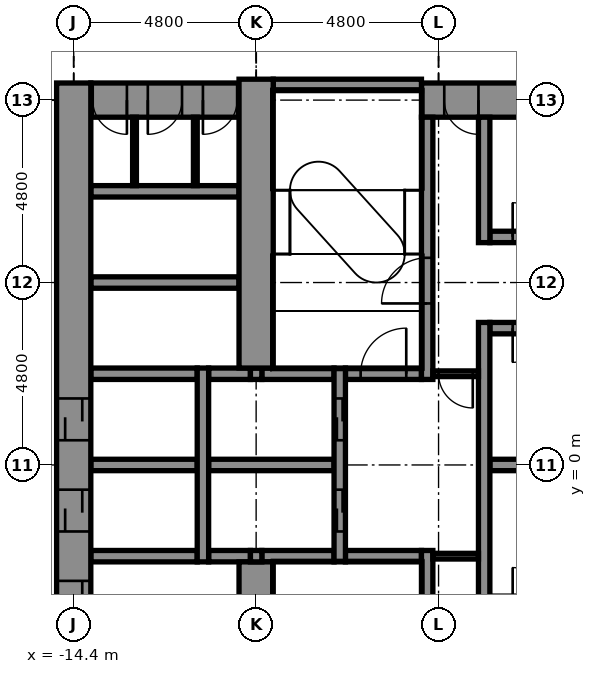
"""IFC4 building model, lengths in metres.
Left out: names, types, materials, properties, quantities, classifications, styles, units other than length and angle.
Written with IfcOpenShell. Run it as: python <this file> out.ifc"""

import sys

from ifc_helpers import new_model, si_unit, direction, frame, frame_2d, origin, place, context, subcontext, project, spatial, rectangle, extrude, element, fill, save


model = new_model("IFC4")
c1 = context("Model", 3, precision=1e-05, world=origin(), true_north=direction((0.0, 1.0)))
c2 = subcontext(c1, "Body", "Model", "MODEL_VIEW")
j1 = project(units=[si_unit("LENGTHUNIT", "METRE"), si_unit("PLANEANGLEUNIT", "RADIAN")], contexts=[c1])
p1 = place(None, origin())
s1 = spatial("IfcSite", under=j1, at=p1, CompositionType="ELEMENT")
p2 = place(p1, origin())
s2 = spatial("IfcBuilding", under=s1, at=p2, CompositionType="ELEMENT")
p3 = place(p2, frame((0.0, 0.0, 122.9)))
s3 = spatial("IfcBuildingStorey", under=s2, at=p3, CompositionType="ELEMENT", Elevation=122.9)
p4 = place(p3, frame((-13.95, -2.4, -0.2), z_axis=(0.0, 0.0, 1.0), x_axis=(1.0, 0.0, 0.0)))
e1 = element("IfcWall", 1, at=p4, inside=s3, PredefinedType="STANDARD", context=c2, shape_type="SweptSolid", body=[
    extrude(rectangle(XDim=2.8, YDim=0.3, at=frame_2d((1.4, 0.0))), origin(), (0.0, 0.0, 1.0), 4.4),
])
p5 = place(p3, frame((-10.85, -2.4, -0.2), z_axis=(0.0, 0.0, 1.0), x_axis=(1.0, 0.0, 0.0)))
e2 = element("IfcWall", 2, at=p5, inside=s3, PredefinedType="STANDARD", context=c2, shape_type="SweptSolid", body=[
    extrude(rectangle(XDim=1.1, YDim=0.3, at=frame_2d((0.55, 0.0))), origin(), (0.0, 0.0, 1.0), 4.4),
])
p6 = place(p3, frame((-9.45, -2.4, -0.2), z_axis=(0.0, 0.0, 1.0), x_axis=(1.0, 0.0, 0.0)))
e3 = element("IfcWall", 3, at=p6, inside=s3, PredefinedType="STANDARD", context=c2, shape_type="SweptSolid", body=[
    extrude(rectangle(XDim=1.9, YDim=0.3, at=frame_2d((0.95, 0.0))), origin(), (0.0, 0.0, 1.0), 4.4),
])
p7 = place(p3, frame((-7.25, -2.4, -0.2), z_axis=(0.0, 0.0, 1.0), x_axis=(1.0, 0.0, 0.0)))
e4 = element("IfcWall", 4, at=p7, inside=s3, PredefinedType="STANDARD", context=c2, shape_type="SweptSolid", body=[
    extrude(rectangle(XDim=2.0, YDim=0.3, at=frame_2d((1.0, 0.0))), origin(), (0.0, 0.0, 1.0), 4.4),
])
p8 = place(p3, frame((-13.95, 0.0, -0.2), z_axis=(0.0, 0.0, 1.0), x_axis=(1.0, 0.0, 0.0)))
e5 = element("IfcWall", 5, at=p8, inside=s3, PredefinedType="STANDARD", context=c2, shape_type="SweptSolid", body=[
    extrude(rectangle(XDim=2.8, YDim=0.3, at=frame_2d((1.4, 0.0))), origin(), (0.0, 0.0, 1.0), 4.4),
])
p9 = place(p3, frame((-10.85, 0.0, -0.2), z_axis=(0.0, 0.0, 1.0), x_axis=(1.0, 0.0, 0.0)))
e6 = element("IfcWall", 6, at=p9, inside=s3, PredefinedType="STANDARD", context=c2, shape_type="SweptSolid", body=[
    extrude(rectangle(XDim=3.3, YDim=0.3, at=frame_2d((1.65, 0.0))), origin(), (0.0, 0.0, 1.0), 4.4),
])
p10 = place(p3, frame((-3.45, 0.0, -0.2), z_axis=(0.0, 0.0, 1.0), x_axis=(1.0, 0.0, 0.0)))
e7 = element("IfcWall", 7, at=p10, inside=s3, PredefinedType="STANDARD", context=c2, shape_type="SweptSolid", body=[
    extrude(rectangle(XDim=2.1, YDim=0.3, at=frame_2d((1.05, 0.0))), origin(), (0.0, 0.0, 1.0), 4.4),
])
p11 = place(p3, frame((-13.95, 2.4, -0.2), z_axis=(0.0, 0.0, 1.0), x_axis=(1.0, 0.0, 0.0)))
e8 = element("IfcWall", 8, at=p11, inside=s3, PredefinedType="STANDARD", context=c2, shape_type="SweptSolid", body=[
    extrude(rectangle(XDim=2.8, YDim=0.3, at=frame_2d((1.4, 0.0))), origin(), (0.0, 0.0, 1.0), 4.4),
])
p12 = place(p3, frame((-10.85, 2.4, -0.2), z_axis=(0.0, 0.0, 1.0), x_axis=(1.0, 0.0, 0.0)))
e9 = element("IfcWall", 9, at=p12, inside=s3, PredefinedType="STANDARD", context=c2, shape_type="SweptSolid", body=[
    extrude(rectangle(XDim=1.1, YDim=0.3, at=frame_2d((0.55, 0.0))), origin(), (0.0, 0.0, 1.0), 4.4),
])
p13 = place(p3, frame((-9.45, 2.4, -0.2), z_axis=(0.0, 0.0, 1.0), x_axis=(1.0, 0.0, 0.0)))
e10 = element("IfcWall", 10, at=p13, inside=s3, PredefinedType="STANDARD", context=c2, shape_type="SweptSolid", body=[
    extrude(rectangle(XDim=1.9, YDim=0.3, at=frame_2d((0.95, 0.0))), origin(), (0.0, 0.0, 1.0), 4.4),
])
p14 = place(p3, frame((-7.25, 2.4, -0.2), z_axis=(0.0, 0.0, 1.0), x_axis=(1.0, 0.0, 0.0)))
e11 = element("IfcWall", 11, at=p14, inside=s3, PredefinedType="STANDARD", context=c2, shape_type="SweptSolid", body=[
    extrude(rectangle(XDim=2.0, YDim=0.3, at=frame_2d((1.0, 0.0))), origin(), (0.0, 0.0, 1.0), 4.4),
])
p15 = place(p14, frame((0.4, 0.0, 0.2)))
e12 = element("IfcOpeningElement", 12, at=p15, cuts=e11, PredefinedType="OPENING", context=c2, shape_type="SweptSolid", body=[
    extrude(rectangle(XDim=1.2, YDim=2.1, at=frame_2d((0.6, 1.05))), frame((0.0, 0.16, 0.0), z_axis=(0.0, -1.0, 0.0), x_axis=(1.0, 0.0, 0.0)), (0.0, 0.0, 1.0), 0.32),
])
p16 = place(p3, frame((-3.45, 3.6, -0.2), z_axis=(0.0, 0.0, 1.0), x_axis=(1.0, 0.0, 0.0)))
e13 = element("IfcWall", 13, at=p16, inside=s3, PredefinedType="STANDARD", context=c2, shape_type="SweptSolid", body=[
    extrude(rectangle(XDim=2.1, YDim=0.3, at=frame_2d((1.05, 0.0))), origin(), (0.0, 0.0, 1.0), 4.4),
])
p17 = place(p16, frame((0.6, 0.0, 0.2)))
e14 = element("IfcOpeningElement", 14, at=p17, cuts=e13, PredefinedType="OPENING", context=c2, shape_type="SweptSolid", body=[
    extrude(rectangle(XDim=0.9, YDim=2.1, at=frame_2d((0.45, 1.05))), frame((0.0, 0.16, 0.0), z_axis=(0.0, -1.0, 0.0), x_axis=(1.0, 0.0, 0.0)), (0.0, 0.0, 1.0), 0.32),
])
p18 = place(p3, frame((-13.95, 4.8, -0.2), z_axis=(0.0, 0.0, 1.0), x_axis=(1.0, 0.0, 0.0)))
e15 = element("IfcWall", 15, at=p18, inside=s3, PredefinedType="STANDARD", context=c2, shape_type="SweptSolid", body=[
    extrude(rectangle(XDim=3.9, YDim=0.3, at=frame_2d((1.95, 0.0))), origin(), (0.0, 0.0, 1.0), 4.4),
])
p19 = place(p3, frame((-3.45, 6.0, -0.2), z_axis=(0.0, 0.0, 1.0), x_axis=(1.0, 0.0, 0.0)))
e16 = element("IfcWall", 16, at=p19, inside=s3, PredefinedType="STANDARD", context=c2, shape_type="SweptSolid", body=[
    extrude(rectangle(XDim=2.1, YDim=0.3, at=frame_2d((1.05, 0.0))), origin(), (0.0, 0.0, 1.0), 4.4),
])
p20 = place(p19, frame((0.6, 0.0, 0.2)))
e17 = element("IfcOpeningElement", 17, at=p20, cuts=e16, PredefinedType="OPENING", context=c2, shape_type="SweptSolid", body=[
    extrude(rectangle(XDim=0.9, YDim=2.1, at=frame_2d((0.45, 1.05))), frame((0.0, 0.16, 0.0), z_axis=(0.0, -1.0, 0.0), x_axis=(1.0, 0.0, 0.0)), (0.0, 0.0, 1.0), 0.32),
])
p21 = place(p3, frame((-13.95, 7.2, -0.2), z_axis=(0.0, 0.0, 1.0), x_axis=(1.0, 0.0, 0.0)))
e18 = element("IfcWall", 18, at=p21, inside=s3, PredefinedType="STANDARD", context=c2, shape_type="SweptSolid", body=[
    extrude(rectangle(XDim=3.9, YDim=0.3, at=frame_2d((1.95, 0.0))), origin(), (0.0, 0.0, 1.0), 4.4),
])
p22 = place(p3, frame((-13.95, 9.6, -0.2), z_axis=(0.0, 0.0, 1.0), x_axis=(1.0, 0.0, 0.0)))
e19 = element("IfcWall", 19, at=p22, inside=s3, PredefinedType="SHEAR", context=c2, shape_type="SweptSolid", body=[
    extrude(rectangle(XDim=3.9, YDim=0.9, at=frame_2d((1.95, 0.0))), origin(), (0.0, 0.0, 1.0), 4.4),
])
p23 = place(p22, frame((0.05, 0.0, 0.2)))
e20 = element("IfcOpeningElement", 20, at=p23, cuts=e19, PredefinedType="OPENING", context=c2, shape_type="SweptSolid", body=[
    extrude(rectangle(XDim=0.9, YDim=2.1, at=frame_2d((0.45, 1.05))), frame((0.0, 0.46, 0.0), z_axis=(0.0, -1.0, 0.0), x_axis=(1.0, 0.0, 0.0)), (0.0, 0.0, 1.0), 0.92),
])
p24 = place(p22, frame((1.5, 0.0, 0.2)))
e21 = element("IfcOpeningElement", 21, at=p24, cuts=e19, PredefinedType="OPENING", context=c2, shape_type="SweptSolid", body=[
    extrude(rectangle(XDim=0.9, YDim=2.1, at=frame_2d((0.45, 1.05))), frame((0.0, 0.46, 0.0), z_axis=(0.0, -1.0, 0.0), x_axis=(1.0, 0.0, 0.0)), (0.0, 0.0, 1.0), 0.92),
])
p25 = place(p22, frame((2.95, 0.0, 0.2)))
e22 = element("IfcOpeningElement", 22, at=p25, cuts=e19, PredefinedType="OPENING", context=c2, shape_type="SweptSolid", body=[
    extrude(rectangle(XDim=0.9, YDim=2.1, at=frame_2d((0.45, 1.05))), frame((0.0, 0.46, 0.0), z_axis=(0.0, -1.0, 0.0), x_axis=(1.0, 0.0, 0.0)), (0.0, 0.0, 1.0), 0.92),
])
p26 = place(p3, frame((-5.25, 9.6, -0.2), z_axis=(0.0, 0.0, 1.0), x_axis=(1.0, 0.0, 0.0)))
e23 = element("IfcWall", 23, at=p26, inside=s3, PredefinedType="SHEAR", context=c2, shape_type="SweptSolid", body=[
    extrude(rectangle(XDim=14.4, YDim=0.9, at=frame_2d((7.2, 0.0))), origin(), (0.0, 0.0, 1.0), 4.4),
])
p27 = place(p26, frame((0.6, 0.0, 0.2)))
e24 = element("IfcOpeningElement", 24, at=p27, cuts=e23, PredefinedType="OPENING", context=c2, shape_type="SweptSolid", body=[
    extrude(rectangle(XDim=0.9, YDim=2.1, at=frame_2d((0.45, 1.05))), frame((0.0, 0.46, 0.0), z_axis=(0.0, -1.0, 0.0), x_axis=(1.0, 0.0, 0.0)), (0.0, 0.0, 1.0), 0.92),
])
p28 = place(p3, frame((-9.15, 10.0, -0.2), z_axis=(0.0, 0.0, 1.0), x_axis=(1.0, 0.0, 0.0)))
e25 = element("IfcWall", 25, at=p28, inside=s3, PredefinedType="STANDARD", context=c2, shape_type="SweptSolid", body=[
    extrude(rectangle(XDim=3.9, YDim=0.3, at=frame_2d((1.95, 0.0))), origin(), (0.0, 0.0, 1.0), 4.4),
])
p29 = place(p3, frame((-14.4, -10.05, -0.2), z_axis=(0.0, 0.0, 1.0), x_axis=(0.0, 1.0, 0.0)))
e26 = element("IfcWall", 26, at=p29, inside=s3, PredefinedType="SHEAR", context=c2, shape_type="SweptSolid", body=[
    extrude(rectangle(XDim=20.1, YDim=0.9, at=frame_2d((10.05, 0.0))), origin(), (0.0, 0.0, 1.0), 4.4),
])
p30 = place(p29, frame((3.5, 0.0, 0.2)))
e27 = element("IfcOpeningElement", 27, at=p30, cuts=e26, PredefinedType="OPENING", context=c2, shape_type="SweptSolid", body=[
    extrude(rectangle(XDim=1.1, YDim=2.1, at=frame_2d((0.55, 1.05))), frame((0.0, 0.46, 0.0), z_axis=(0.0, -1.0, 0.0), x_axis=(1.0, 0.0, 0.0)), (0.0, 0.0, 1.0), 0.92),
])
p31 = place(p29, frame((5.9, 0.0, 0.2)))
e28 = element("IfcOpeningElement", 28, at=p31, cuts=e26, PredefinedType="OPENING", context=c2, shape_type="SweptSolid", body=[
    extrude(rectangle(XDim=1.1, YDim=2.1, at=frame_2d((0.55, 1.05))), frame((0.0, 0.46, 0.0), z_axis=(0.0, -1.0, 0.0), x_axis=(1.0, 0.0, 0.0)), (0.0, 0.0, 1.0), 0.92),
])
p32 = place(p29, frame((8.3, 0.0, 0.2)))
e29 = element("IfcOpeningElement", 29, at=p32, cuts=e26, PredefinedType="OPENING", context=c2, shape_type="SweptSolid", body=[
    extrude(rectangle(XDim=1.1, YDim=2.1, at=frame_2d((0.55, 1.05))), frame((0.0, 0.46, 0.0), z_axis=(0.0, -1.0, 0.0), x_axis=(1.0, 0.0, 0.0)), (0.0, 0.0, 1.0), 0.92),
])
p33 = place(p29, frame((10.7, 0.0, 0.2)))
e30 = element("IfcOpeningElement", 30, at=p33, cuts=e26, PredefinedType="OPENING", context=c2, shape_type="SweptSolid", body=[
    extrude(rectangle(XDim=1.1, YDim=2.1, at=frame_2d((0.55, 1.05))), frame((0.0, 0.46, 0.0), z_axis=(0.0, -1.0, 0.0), x_axis=(1.0, 0.0, 0.0)), (0.0, 0.0, 1.0), 0.92),
])
p34 = place(p3, frame((-11.0, -2.55, -0.2), z_axis=(0.0, 0.0, 1.0), x_axis=(0.0, 1.0, 0.0)))
e31 = element("IfcWall", 31, at=p34, inside=s3, PredefinedType="STANDARD", context=c2, shape_type="SweptSolid", body=[
    extrude(rectangle(XDim=5.1, YDim=0.3, at=frame_2d((2.55, 0.0))), origin(), (0.0, 0.0, 1.0), 4.4),
])
p35 = place(p3, frame((-9.6, -10.15, -0.2), z_axis=(0.0, 0.0, 1.0), x_axis=(0.0, 1.0, 0.0)))
e32 = element("IfcWall", 32, at=p35, inside=s3, PredefinedType="SHEAR", context=c2, shape_type="SweptSolid", body=[
    extrude(rectangle(XDim=7.6, YDim=0.9, at=frame_2d((3.8, 0.0))), origin(), (0.0, 0.0, 1.0), 4.4),
])
for number, where, z_axis, x_axis in (
    (33, (-9.6, -2.55, -0.2), (0.0, 0.0, 1.0), (0.0, 1.0, 0.0)),
    (34, (-9.6, 2.25, -0.2), (0.0, 0.0, 1.0), (0.0, 1.0, 0.0)),
):
    element("IfcWall", number, at=place(p3, frame(where, z_axis=z_axis, x_axis=x_axis)), inside=s3, PredefinedType="STANDARD", context=c2, shape_type="SweptSolid", body=[
        extrude(rectangle(XDim=0.3, YDim=0.3, at=frame_2d((0.15, 0.0))), origin(), (0.0, 0.0, 1.0), 4.4),
    ])
p36 = place(p3, frame((-9.6, 2.55, -0.2), z_axis=(0.0, 0.0, 1.0), x_axis=(0.0, 1.0, 0.0)))
e35 = element("IfcWall", 35, at=p36, inside=s3, PredefinedType="SHEAR", context=c2, shape_type="SweptSolid", body=[
    extrude(rectangle(XDim=7.6, YDim=0.9, at=frame_2d((3.8, 0.0))), origin(), (0.0, 0.0, 1.0), 4.4),
])
p37 = place(p3, frame((-7.4, -2.55, -0.2), z_axis=(0.0, 0.0, 1.0), x_axis=(0.0, 1.0, 0.0)))
e36 = element("IfcWall", 36, at=p37, inside=s3, PredefinedType="STANDARD", context=c2, shape_type="SweptSolid", body=[
    extrude(rectangle(XDim=5.1, YDim=0.3, at=frame_2d((2.55, 0.0))), origin(), (0.0, 0.0, 1.0), 4.4),
])
p38 = place(p37, frame((0.8, 0.0, 0.2)))
e37 = element("IfcOpeningElement", 37, at=p38, cuts=e36, PredefinedType="OPENING", context=c2, shape_type="SweptSolid", body=[
    extrude(rectangle(XDim=1.1, YDim=2.1, at=frame_2d((0.55, 1.05))), frame((0.0, 0.16, 0.0), z_axis=(0.0, -1.0, 0.0), x_axis=(1.0, 0.0, 0.0)), (0.0, 0.0, 1.0), 0.32),
])
p39 = place(p37, frame((3.2, 0.0, 0.2)))
e38 = element("IfcOpeningElement", 38, at=p39, cuts=e36, PredefinedType="OPENING", context=c2, shape_type="SweptSolid", body=[
    extrude(rectangle(XDim=1.1, YDim=2.1, at=frame_2d((0.55, 1.05))), frame((0.0, 0.16, 0.0), z_axis=(0.0, -1.0, 0.0), x_axis=(1.0, 0.0, 0.0)), (0.0, 0.0, 1.0), 0.32),
])
p40 = place(p3, frame((-5.1, -9.15, -0.2), z_axis=(0.0, 0.0, 1.0), x_axis=(0.0, 1.0, 0.0)))
e39 = element("IfcWall", 39, at=p40, inside=s3, PredefinedType="STANDARD", context=c2, shape_type="SweptSolid", body=[
    extrude(rectangle(XDim=6.9, YDim=0.3, at=frame_2d((3.45, 0.0))), origin(), (0.0, 0.0, 1.0), 4.4),
])
p41 = place(p40, frame((3.7, 0.0, 0.2)))
e40 = element("IfcOpeningElement", 40, at=p41, cuts=e39, PredefinedType="OPENING", context=c2, shape_type="SweptSolid", body=[
    extrude(rectangle(XDim=1.2, YDim=2.1, at=frame_2d((0.6, 1.05))), frame((0.0, 0.16, 0.0), z_axis=(0.0, -1.0, 0.0), x_axis=(1.0, 0.0, 0.0)), (0.0, 0.0, 1.0), 0.32),
])
p42 = place(p3, frame((-5.1, 2.25, -0.2), z_axis=(0.0, 0.0, 1.0), x_axis=(0.0, 1.0, 0.0)))
e41 = element("IfcWall", 41, at=p42, inside=s3, PredefinedType="STANDARD", context=c2, shape_type="SweptSolid", body=[
    extrude(rectangle(XDim=6.9, YDim=0.3, at=frame_2d((3.45, 0.0))), origin(), (0.0, 0.0, 1.0), 4.4),
])
p43 = place(p42, frame((2.0, 0.0, 0.2)))
e42 = element("IfcOpeningElement", 42, at=p43, cuts=e41, PredefinedType="OPENING", context=c2, shape_type="SweptSolid", body=[
    extrude(rectangle(XDim=1.2, YDim=2.1, at=frame_2d((0.6, 1.05))), frame((0.0, 0.16, 0.0), z_axis=(0.0, -1.0, 0.0), x_axis=(1.0, 0.0, 0.0)), (0.0, 0.0, 1.0), 0.32),
])
p44 = place(p3, frame((-3.6, -3.75, -0.2), z_axis=(0.0, 0.0, 1.0), x_axis=(0.0, 1.0, 0.0)))
e43 = element("IfcWall", 43, at=p44, inside=s3, PredefinedType="STANDARD", context=c2, shape_type="SweptSolid", body=[
    extrude(rectangle(XDim=7.5, YDim=0.3, at=frame_2d((3.75, 0.0))), origin(), (0.0, 0.0, 1.0), 4.4),
])
p45 = place(p3, frame((-3.6, 5.85, -0.2), z_axis=(0.0, 0.0, 1.0), x_axis=(0.0, 1.0, 0.0)))
e44 = element("IfcWall", 44, at=p45, inside=s3, PredefinedType="STANDARD", context=c2, shape_type="SweptSolid", body=[
    extrude(rectangle(XDim=3.3, YDim=0.3, at=frame_2d((1.65, 0.0))), origin(), (0.0, 0.0, 1.0), 4.4),
])
for number, where, z_axis, x_axis in (
    (45, (-11.2, 7.35, 0.0), (0.0, 0.0, 1.0), (0.0, 1.0, 0.0)),
    (46, (-12.8, 7.35, 0.0), (0.0, 0.0, 1.0), (0.0, 1.0, 0.0)),
):
    element("IfcWall", number, at=place(p3, frame(where, z_axis=z_axis, x_axis=x_axis)), inside=s3, PredefinedType="PARTITIONING", context=c2, shape_type="SweptSolid", body=[
        extrude(rectangle(XDim=1.8, YDim=0.1, at=frame_2d((0.9, 0.0))), origin(), (0.0, 0.0, 1.0), 4.2),
    ])
p46 = place(p3, frame((-4.95, 2.4, 0.0), z_axis=(0.0, 0.0, 1.0), x_axis=(1.0, 0.0, 0.0)))
e47 = element("IfcWall", 47, at=p46, inside=s3, PredefinedType="PARTITIONING", context=c2, shape_type="SweptSolid", body=[
    extrude(rectangle(XDim=1.2, YDim=0.15, at=frame_2d((0.6, 0.0))), origin(), (0.0, 0.0, 1.0), 4.2),
])
p47 = place(p46, frame((0.15, 0.0, 0.0)))
e48 = element("IfcOpeningElement", 48, at=p47, cuts=e47, PredefinedType="OPENING", context=c2, shape_type="SweptSolid", body=[
    extrude(rectangle(XDim=0.9, YDim=2.1, at=frame_2d((0.45, 1.05))), frame((0.0, 0.085, 0.0), z_axis=(0.0, -1.0, 0.0), x_axis=(1.0, 0.0, 0.0)), (0.0, 0.0, 1.0), 0.17),
])
p48 = place(p3, frame((-4.95, -2.4, 0.0), z_axis=(0.0, 0.0, 1.0), x_axis=(1.0, 0.0, 0.0)))
e49 = element("IfcWall", 49, at=p48, inside=s3, PredefinedType="PARTITIONING", context=c2, shape_type="SweptSolid", body=[
    extrude(rectangle(XDim=1.2, YDim=0.15, at=frame_2d((0.6, 0.0))), origin(), (0.0, 0.0, 1.0), 4.2),
])
p49 = place(p38, origin())
e50 = element("IfcDoor", 50, at=p49, inside=s3, OperationType="DOUBLE_DOOR_SLIDING", PredefinedType="DOOR", context=c2, shape_type="SweptSolid", body=[
    extrude(rectangle(XDim=1.1, YDim=2.1, at=frame_2d((0.55, 1.05))), frame((0.0, 0.025, 0.0), z_axis=(0.0, -1.0, 0.0), x_axis=(1.0, 0.0, 0.0)), (0.0, 0.0, 1.0), 0.05),
])
fill(e37, e50)
p50 = place(p39, origin())
e51 = element("IfcDoor", 51, at=p50, inside=s3, OperationType="DOUBLE_DOOR_SLIDING", PredefinedType="DOOR", context=c2, shape_type="SweptSolid", body=[
    extrude(rectangle(XDim=1.1, YDim=2.1, at=frame_2d((0.55, 1.05))), frame((0.0, 0.025, 0.0), z_axis=(0.0, -1.0, 0.0), x_axis=(1.0, 0.0, 0.0)), (0.0, 0.0, 1.0), 0.05),
])
fill(e38, e51)
p51 = place(p31, origin())
e52 = element("IfcDoor", 52, at=p51, inside=s3, OperationType="DOUBLE_DOOR_SLIDING", PredefinedType="DOOR", context=c2, shape_type="SweptSolid", body=[
    extrude(rectangle(XDim=1.1, YDim=2.1, at=frame_2d((0.55, 1.05))), frame((0.0, 0.025, 0.0), z_axis=(0.0, -1.0, 0.0), x_axis=(1.0, 0.0, 0.0)), (0.0, 0.0, 1.0), 0.05),
])
fill(e28, e52)
p52 = place(p32, origin())
e53 = element("IfcDoor", 53, at=p52, inside=s3, OperationType="DOUBLE_DOOR_SLIDING", PredefinedType="DOOR", context=c2, shape_type="SweptSolid", body=[
    extrude(rectangle(XDim=1.1, YDim=2.1, at=frame_2d((0.55, 1.05))), frame((0.0, 0.025, 0.0), z_axis=(0.0, -1.0, 0.0), x_axis=(1.0, 0.0, 0.0)), (0.0, 0.0, 1.0), 0.05),
])
fill(e29, e53)
p53 = place(p33, origin())
e54 = element("IfcDoor", 54, at=p53, inside=s3, OperationType="DOUBLE_DOOR_SLIDING", PredefinedType="DOOR", context=c2, shape_type="SweptSolid", body=[
    extrude(rectangle(XDim=1.1, YDim=2.1, at=frame_2d((0.55, 1.05))), frame((0.0, 0.025, 0.0), z_axis=(0.0, -1.0, 0.0), x_axis=(1.0, 0.0, 0.0)), (0.0, 0.0, 1.0), 0.05),
])
fill(e30, e54)
p54 = place(p43, origin())
e55 = element("IfcDoor", 55, at=p54, inside=s3, OperationType="SINGLE_SWING_LEFT", PredefinedType="DOOR", context=c2, shape_type="SweptSolid", body=[
    extrude(rectangle(XDim=1.2, YDim=2.1, at=frame_2d((0.6, 1.05))), frame((0.0, 0.025, 0.0), z_axis=(0.0, -1.0, 0.0), x_axis=(1.0, 0.0, 0.0)), (0.0, 0.0, 1.0), 0.05),
])
fill(e42, e55)
p55 = place(p20, origin())
e56 = element("IfcDoor", 56, at=p55, inside=s3, OperationType="SINGLE_SWING_LEFT", PredefinedType="DOOR", context=c2, shape_type="SweptSolid", body=[
    extrude(rectangle(XDim=0.9, YDim=2.1, at=frame_2d((0.45, 1.05))), frame((0.0, 0.025, 0.0), z_axis=(0.0, -1.0, 0.0), x_axis=(1.0, 0.0, 0.0)), (0.0, 0.0, 1.0), 0.05),
])
fill(e17, e56)
p56 = place(p17, frame((0.9, 0.0, 0.0), z_axis=(0.0, 0.0, 1.0), x_axis=(-1.0, 0.0, 0.0)))
e57 = element("IfcDoor", 57, at=p56, inside=s3, OperationType="SINGLE_SWING_LEFT", PredefinedType="DOOR", context=c2, shape_type="SweptSolid", body=[
    extrude(rectangle(XDim=0.9, YDim=2.1, at=frame_2d((0.45, 1.05))), frame((0.0, 0.025, 0.0), z_axis=(0.0, -1.0, 0.0), x_axis=(1.0, 0.0, 0.0)), (0.0, 0.0, 1.0), 0.05),
])
fill(e14, e57)
p57 = place(p23, frame((0.9, 0.0, 0.0), z_axis=(0.0, 0.0, 1.0), x_axis=(-1.0, 0.0, 0.0)))
e58 = element("IfcDoor", 58, at=p57, inside=s3, OperationType="SINGLE_SWING_RIGHT", PredefinedType="DOOR", context=c2, shape_type="SweptSolid", body=[
    extrude(rectangle(XDim=0.9, YDim=2.1, at=frame_2d((0.45, 1.05))), frame((0.0, 0.025, 0.0), z_axis=(0.0, -1.0, 0.0), x_axis=(1.0, 0.0, 0.0)), (0.0, 0.0, 1.0), 0.05),
])
fill(e20, e58)
p58 = place(p24, frame((0.9, 0.0, 0.0), z_axis=(0.0, 0.0, 1.0), x_axis=(-1.0, 0.0, 0.0)))
e59 = element("IfcDoor", 59, at=p58, inside=s3, OperationType="SINGLE_SWING_LEFT", PredefinedType="DOOR", context=c2, shape_type="SweptSolid", body=[
    extrude(rectangle(XDim=0.9, YDim=2.1, at=frame_2d((0.45, 1.05))), frame((0.0, 0.025, 0.0), z_axis=(0.0, -1.0, 0.0), x_axis=(1.0, 0.0, 0.0)), (0.0, 0.0, 1.0), 0.05),
])
fill(e21, e59)
p59 = place(p25, frame((0.9, 0.0, 0.0), z_axis=(0.0, 0.0, 1.0), x_axis=(-1.0, 0.0, 0.0)))
e60 = element("IfcDoor", 60, at=p59, inside=s3, OperationType="SINGLE_SWING_LEFT", PredefinedType="DOOR", context=c2, shape_type="SweptSolid", body=[
    extrude(rectangle(XDim=0.9, YDim=2.1, at=frame_2d((0.45, 1.05))), frame((0.0, 0.025, 0.0), z_axis=(0.0, -1.0, 0.0), x_axis=(1.0, 0.0, 0.0)), (0.0, 0.0, 1.0), 0.05),
])
fill(e22, e60)
p60 = place(p27, frame((0.9, 0.0, 0.0), z_axis=(0.0, 0.0, 1.0), x_axis=(-1.0, 0.0, 0.0)))
e61 = element("IfcDoor", 61, at=p60, inside=s3, OperationType="SINGLE_SWING_RIGHT", PredefinedType="DOOR", context=c2, shape_type="SweptSolid", body=[
    extrude(rectangle(XDim=0.9, YDim=2.1, at=frame_2d((0.45, 1.05))), frame((0.0, 0.025, 0.0), z_axis=(0.0, -1.0, 0.0), x_axis=(1.0, 0.0, 0.0)), (0.0, 0.0, 1.0), 0.05),
])
fill(e24, e61)
p61 = place(p47, frame((0.9, 0.0, 0.0), z_axis=(0.0, 0.0, 1.0), x_axis=(-1.0, 0.0, 0.0)))
e62 = element("IfcDoor", 62, at=p61, inside=s3, OperationType="SINGLE_SWING_RIGHT", PredefinedType="DOOR", context=c2, shape_type="SweptSolid", body=[
    extrude(rectangle(XDim=0.9, YDim=2.1, at=frame_2d((0.45, 1.05))), frame((0.0, 0.025, 0.0), z_axis=(0.0, -1.0, 0.0), x_axis=(1.0, 0.0, 0.0)), (0.0, 0.0, 1.0), 0.05),
])
fill(e48, e62)
p62 = place(p15, origin())
e63 = element("IfcDoor", 63, at=p62, inside=s3, OperationType="SINGLE_SWING_RIGHT", PredefinedType="DOOR", context=c2, shape_type="SweptSolid", body=[
    extrude(rectangle(XDim=1.2, YDim=2.1, at=frame_2d((0.6, 1.05))), frame((0.0, 0.025, 0.0), z_axis=(0.0, -1.0, 0.0), x_axis=(1.0, 0.0, 0.0)), (0.0, 0.0, 1.0), 0.05),
])
fill(e12, e63)
save(model, sys.argv[1])
